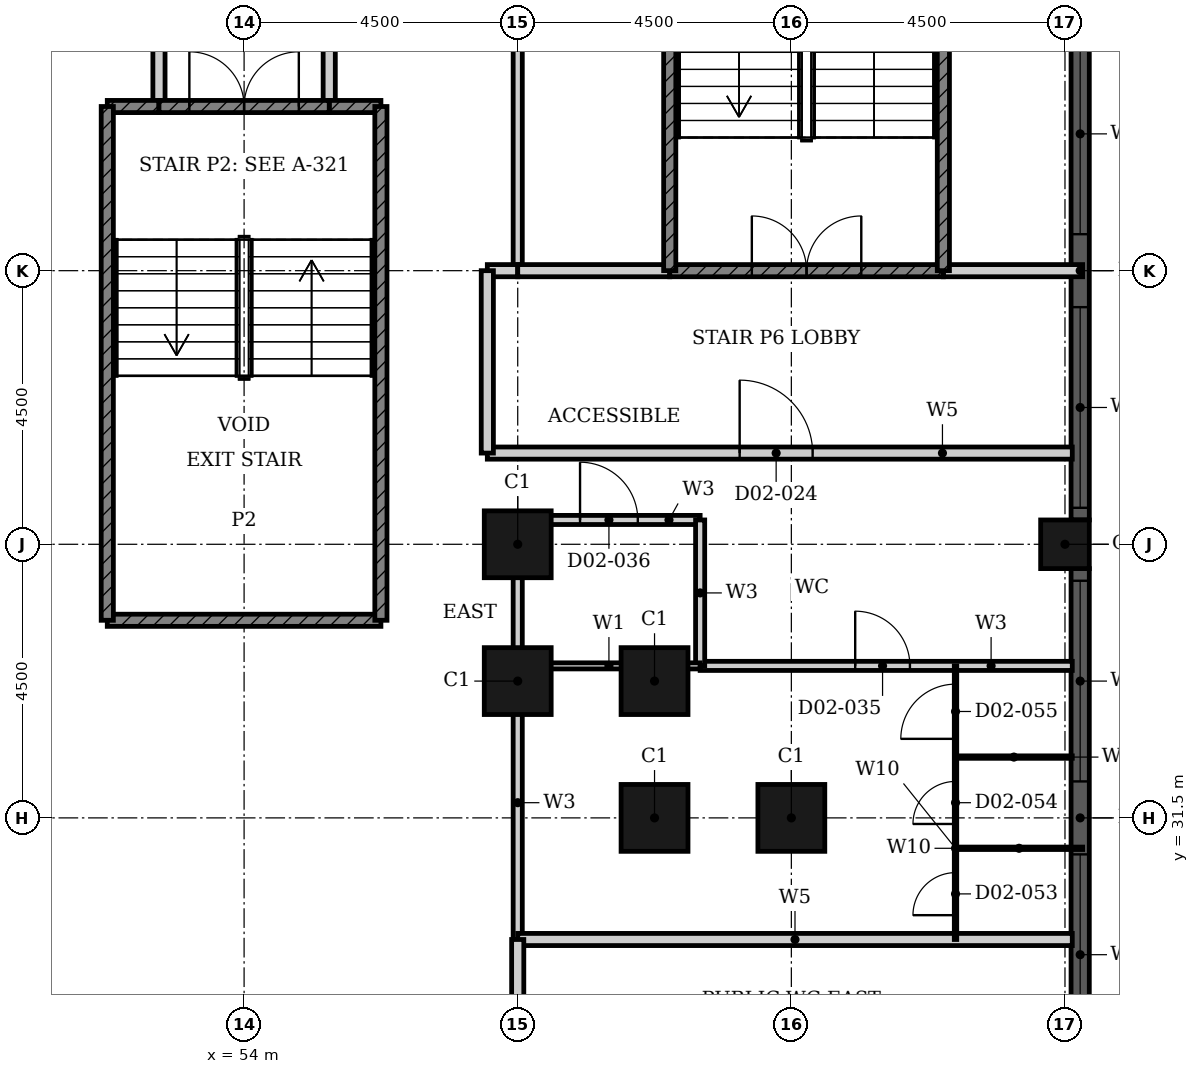
"""IFC4 building model, lengths in metres.
Left out: names, types, materials, properties, quantities, classifications, styles, units other than length and angle.
Written with IfcOpenShell. Run it as: python <this file> out.ifc"""

import sys

from ifc_helpers import new_model, si_unit, direction, frame, frame_2d, origin, origin_2d, place, context, subcontext, project, spatial, rectangle, hollow_rectangle, extrude, element, fill, save


model = new_model("IFC4")
c1 = context("Model", 3, precision=1e-05, world=origin(), true_north=direction((0.0, 1.0)))
c2 = subcontext(c1, "Body", "Model", "MODEL_VIEW")
j1 = project(units=[si_unit("LENGTHUNIT", "METRE"), si_unit("PLANEANGLEUNIT", "RADIAN")], contexts=[c1])
p1 = place(None, origin())
s1 = spatial("IfcSite", under=j1, at=p1, CompositionType="ELEMENT")
p2 = place(p1, origin())
s2 = spatial("IfcBuilding", under=s1, at=p2, CompositionType="ELEMENT")
p3 = place(p2, frame((0.0, 0.0, 12.0)))
s3 = spatial("IfcBuildingStorey", under=s2, at=p3, CompositionType="ELEMENT", Elevation=12.0)
for number, where, z_axis, x_axis in (
    (1, (63.0, 31.5, 0.0), (0.0, 0.0, 1.0), (1.0, 0.0, 0.0)),
    (2, (60.75, 31.5, 0.0), (0.0, 0.0, 1.0), (1.0, 0.0, 0.0)),
    (3, (60.75, 33.75, 0.0), (0.0, 0.0, 1.0), (1.0, 0.0, 0.0)),
    (4, (58.5, 33.75, 0.0), (0.0, 0.0, 1.0), (1.0, 0.0, 0.0)),
    (5, (58.5, 36.0, 0.0), (0.0, 0.0, 1.0), (1.0, 0.0, 0.0)),
):
    element("IfcColumn", number, at=place(p3, frame(where, z_axis=z_axis, x_axis=x_axis)), inside=s3, PredefinedType="COLUMN", context=c2, shape_type="SweptSolid", body=[
        extrude(hollow_rectangle(XDim=1.1, YDim=1.1, WallThickness=0.036, at=origin_2d()), origin(), (0.0, 0.0, 1.0), 5.4),
    ])
p4 = place(p3, frame((67.5, 36.0, 0.0), z_axis=(0.0, 0.0, 1.0), x_axis=(1.0, 0.0, 0.0)))
e6 = element("IfcColumn", 6, at=p4, inside=s3, PredefinedType="COLUMN", context=c2, shape_type="SweptSolid", body=[
    extrude(hollow_rectangle(XDim=0.8, YDim=0.8, WallThickness=0.025, at=origin_2d()), origin(), (0.0, 0.0, 1.0), 5.4),
])
p5 = place(p3, frame((67.75, 27.4, 0.0), z_axis=(0.0, 0.0, 1.0), x_axis=(0.0, 1.0, 0.0)))
e7 = element("IfcWall", 7, at=p5, inside=s3, PredefinedType="SOLIDWALL", context=c2, shape_type="SweptSolid", body=[
    extrude(rectangle(XDim=8.2, YDim=0.3, at=frame_2d((4.1, 0.0))), origin(), (0.0, 0.0, 1.0), 5.4),
])
p6 = place(p5, frame((0.2, 0.0, 0.9)))
e8 = element("IfcOpeningElement", 8, at=p6, cuts=e7, PredefinedType="OPENING", context=c2, shape_type="SweptSolid", body=[
    extrude(rectangle(XDim=3.3, YDim=3.5, at=frame_2d((1.65, 1.75))), frame((0.0, 0.16, 0.0), z_axis=(0.0, -1.0, 0.0), x_axis=(1.0, 0.0, 0.0)), (0.0, 0.0, 1.0), 0.32),
])
p7 = place(p5, frame((4.7, 0.0, 0.9)))
e9 = element("IfcOpeningElement", 9, at=p7, cuts=e7, PredefinedType="OPENING", context=c2, shape_type="SweptSolid", body=[
    extrude(rectangle(XDim=3.3, YDim=3.5, at=frame_2d((1.65, 1.75))), frame((0.0, 0.16, 0.0), z_axis=(0.0, -1.0, 0.0), x_axis=(1.0, 0.0, 0.0)), (0.0, 0.0, 1.0), 0.32),
])
p8 = place(p3, frame((67.75, 36.4, 0.0), z_axis=(0.0, 0.0, 1.0), x_axis=(0.0, 1.0, 0.0)))
e10 = element("IfcWall", 10, at=p8, inside=s3, PredefinedType="SOLIDWALL", context=c2, shape_type="SweptSolid", body=[
    extrude(rectangle(XDim=8.2, YDim=0.3, at=frame_2d((4.1, 0.0))), origin(), (0.0, 0.0, 1.0), 5.4),
])
p9 = place(p8, frame((0.2, 0.0, 0.9)))
e11 = element("IfcOpeningElement", 11, at=p9, cuts=e10, PredefinedType="OPENING", context=c2, shape_type="SweptSolid", body=[
    extrude(rectangle(XDim=3.3, YDim=3.5, at=frame_2d((1.65, 1.75))), frame((0.0, 0.16, 0.0), z_axis=(0.0, -1.0, 0.0), x_axis=(1.0, 0.0, 0.0)), (0.0, 0.0, 1.0), 0.32),
])
p10 = place(p8, frame((4.7, 0.0, 0.9)))
e12 = element("IfcOpeningElement", 12, at=p10, cuts=e10, PredefinedType="OPENING", context=c2, shape_type="SweptSolid", body=[
    extrude(rectangle(XDim=3.3, YDim=3.5, at=frame_2d((1.65, 1.75))), frame((0.0, 0.16, 0.0), z_axis=(0.0, -1.0, 0.0), x_axis=(1.0, 0.0, 0.0)), (0.0, 0.0, 1.0), 0.32),
])
p11 = place(p3, frame((61.5, 34.0, 0.0), z_axis=(0.0, 0.0, 1.0), x_axis=(1.0, 0.0, 0.0)))
e13 = element("IfcWall", 13, at=p11, inside=s3, PredefinedType="PARTITIONING", context=c2, shape_type="SweptSolid", body=[
    extrude(rectangle(XDim=6.12, YDim=0.15, at=frame_2d((3.06, 0.0))), origin(), (0.0, 0.0, 1.0), 5.05),
])
p12 = place(p11, frame((2.55, 0.0, 0.0)))
e14 = element("IfcOpeningElement", 14, at=p12, cuts=e13, PredefinedType="OPENING", context=c2, shape_type="SweptSolid", body=[
    extrude(rectangle(XDim=0.9, YDim=2.1, at=frame_2d((0.45, 1.05))), frame((0.0, 0.085, 0.0), z_axis=(0.0, -1.0, 0.0), x_axis=(1.0, 0.0, 0.0)), (0.0, 0.0, 1.0), 0.17),
])
p13 = place(p3, frame((58.5, 36.4, 0.0), z_axis=(0.0, 0.0, 1.0), x_axis=(1.0, 0.0, 0.0)))
e15 = element("IfcWall", 15, at=p13, inside=s3, PredefinedType="PARTITIONING", context=c2, shape_type="SweptSolid", body=[
    extrude(rectangle(XDim=3.0, YDim=0.15, at=frame_2d((1.5, 0.0))), origin(), (0.0, 0.0, 1.0), 5.05),
])
p14 = place(p13, frame((1.025, 0.0, 0.0)))
e16 = element("IfcOpeningElement", 16, at=p14, cuts=e15, PredefinedType="OPENING", context=c2, shape_type="SweptSolid", body=[
    extrude(rectangle(XDim=0.95, YDim=2.1, at=frame_2d((0.475, 1.05))), frame((0.0, 0.085, 0.0), z_axis=(0.0, -1.0, 0.0), x_axis=(1.0, 0.0, 0.0)), (0.0, 0.0, 1.0), 0.17),
])
p15 = place(p3, frame((58.5, 29.5, 0.0), z_axis=(0.0, 0.0, 1.0), x_axis=(0.0, 1.0, 0.0)))
e17 = element("IfcWall", 17, at=p15, inside=s3, PredefinedType="PARTITIONING", context=c2, shape_type="SweptSolid", body=[
    extrude(rectangle(XDim=4.5, YDim=0.15, at=frame_2d((2.25, 0.0))), origin(), (0.0, 0.0, 1.0), 5.05),
])
p16 = place(p3, frame((58.5, 34.0, 0.0), z_axis=(0.0, 0.0, 1.0), x_axis=(0.0, 1.0, 0.0)))
e18 = element("IfcWall", 18, at=p16, inside=s3, PredefinedType="PARTITIONING", context=c2, shape_type="SweptSolid", body=[
    extrude(rectangle(XDim=2.4, YDim=0.15, at=frame_2d((1.2, 0.0))), origin(), (0.0, 0.0, 1.0), 5.05),
])
p17 = place(p3, frame((58.5, 40.5, 0.0), z_axis=(0.0, 0.0, 1.0), x_axis=(0.0, 1.0, 0.0)))
e19 = element("IfcWall", 19, at=p17, inside=s3, PredefinedType="PARTITIONING", context=c2, shape_type="SweptSolid", body=[
    extrude(rectangle(XDim=13.69, YDim=0.15, at=frame_2d((6.845, 0.0))), origin(), (0.0, 0.0, 1.0), 5.05),
])
p18 = place(p17, frame((6.15, 0.0, 0.0)))
e20 = element("IfcOpeningElement", 20, at=p18, cuts=e19, PredefinedType="OPENING", context=c2, shape_type="SweptSolid", body=[
    extrude(rectangle(XDim=1.2, YDim=2.4, at=frame_2d((0.6, 1.2))), frame((0.0, 0.085, 0.0), z_axis=(0.0, -1.0, 0.0), x_axis=(1.0, 0.0, 0.0)), (0.0, 0.0, 1.0), 0.17),
])
p19 = place(p3, frame((61.5, 34.0, 0.0), z_axis=(0.0, 0.0, 1.0), x_axis=(0.0, 1.0, 0.0)))
e21 = element("IfcWall", 21, at=p19, inside=s3, PredefinedType="PARTITIONING", context=c2, shape_type="SweptSolid", body=[
    extrude(rectangle(XDim=2.4, YDim=0.15, at=frame_2d((1.2, 0.0))), origin(), (0.0, 0.0, 1.0), 5.05),
])
p20 = place(p3, frame((58.5, 34.0, 0.0), z_axis=(0.0, 0.0, 1.0), x_axis=(1.0, 0.0, 0.0)))
e22 = element("IfcWall", 22, at=p20, inside=s3, PredefinedType="PARTITIONING", context=c2, shape_type="SweptSolid", body=[
    extrude(rectangle(XDim=3.0, YDim=0.1, at=frame_2d((1.5, 0.0))), origin(), (0.0, 0.0, 1.0), 5.05),
])
p21 = place(p3, frame((58.5, 29.5, 0.0), z_axis=(0.0, 0.0, 1.0), x_axis=(1.0, 0.0, 0.0)))
e23 = element("IfcWall", 23, at=p21, inside=s3, PredefinedType="PARTITIONING", context=c2, shape_type="SweptSolid", body=[
    extrude(rectangle(XDim=9.12, YDim=0.2, at=frame_2d((4.56, 0.0))), origin(), (0.0, 0.0, 1.0), 5.05),
])
p22 = place(p3, frame((58.0, 37.5, 0.0), z_axis=(0.0, 0.0, 1.0), x_axis=(1.0, 0.0, 0.0)))
e24 = element("IfcWall", 24, at=p22, inside=s3, PredefinedType="PARTITIONING", context=c2, shape_type="SweptSolid", body=[
    extrude(rectangle(XDim=9.62, YDim=0.2, at=frame_2d((4.81, 0.0))), origin(), (0.0, 0.0, 1.0), 5.05),
])
p23 = place(p22, frame((4.15, 0.0, 0.0)))
e25 = element("IfcOpeningElement", 25, at=p23, cuts=e24, PredefinedType="OPENING", context=c2, shape_type="SweptSolid", body=[
    extrude(rectangle(XDim=1.2, YDim=2.1, at=frame_2d((0.6, 1.05))), frame((0.0, 0.11, 0.0), z_axis=(0.0, -1.0, 0.0), x_axis=(1.0, 0.0, 0.0)), (0.0, 0.0, 1.0), 0.22),
])
p24 = place(p3, frame((58.0, 40.5, 0.0), z_axis=(0.0, 0.0, 1.0), x_axis=(1.0, 0.0, 0.0)))
e26 = element("IfcWall", 26, at=p24, inside=s3, PredefinedType="PARTITIONING", context=c2, shape_type="SweptSolid", body=[
    extrude(rectangle(XDim=0.5, YDim=0.2, at=frame_2d((0.25, 0.0))), origin(), (0.0, 0.0, 1.0), 5.05),
])
p25 = place(p3, frame((58.5, 40.5, 0.0), z_axis=(0.0, 0.0, 1.0), x_axis=(1.0, 0.0, 0.0)))
e27 = element("IfcWall", 27, at=p25, inside=s3, PredefinedType="PARTITIONING", context=c2, shape_type="SweptSolid", body=[
    extrude(rectangle(XDim=2.5, YDim=0.2, at=frame_2d((1.25, 0.0))), origin(), (0.0, 0.0, 1.0), 5.05),
])
p26 = place(p3, frame((65.5, 40.5, 0.0), z_axis=(0.0, 0.0, 1.0), x_axis=(1.0, 0.0, 0.0)))
e28 = element("IfcWall", 28, at=p26, inside=s3, PredefinedType="PARTITIONING", context=c2, shape_type="SweptSolid", body=[
    extrude(rectangle(XDim=2.29, YDim=0.2, at=frame_2d((1.145, 0.0))), origin(), (0.0, 0.0, 1.0), 5.05),
])
p27 = place(p3, frame((52.6, 43.2, 0.0), z_axis=(0.0, 0.0, 1.0), x_axis=(0.0, 1.0, 0.0)))
e29 = element("IfcWall", 29, at=p27, inside=s3, PredefinedType="PARTITIONING", context=c2, shape_type="SweptSolid", body=[
    extrude(rectangle(XDim=1.8, YDim=0.2, at=frame_2d((0.9, 0.0))), origin(), (0.0, 0.0, 1.0), 5.05),
])
p28 = place(p3, frame((55.4, 43.2, 0.0), z_axis=(0.0, 0.0, 1.0), x_axis=(0.0, 1.0, 0.0)))
e30 = element("IfcWall", 30, at=p28, inside=s3, PredefinedType="PARTITIONING", context=c2, shape_type="SweptSolid", body=[
    extrude(rectangle(XDim=10.92, YDim=0.2, at=frame_2d((5.46, 0.0))), origin(), (0.0, 0.0, 1.0), 5.05),
])
p29 = place(p28, frame((4.8, 0.0, 0.0)))
e31 = element("IfcOpeningElement", 31, at=p29, cuts=e30, PredefinedType="OPENING", context=c2, shape_type="SweptSolid", body=[
    extrude(rectangle(XDim=1.2, YDim=2.1, at=frame_2d((0.6, 1.05))), frame((0.0, 0.11, 0.0), z_axis=(0.0, -1.0, 0.0), x_axis=(1.0, 0.0, 0.0)), (0.0, 0.0, 1.0), 0.22),
])
p30 = place(p3, frame((58.0, 37.5, 0.0), z_axis=(0.0, 0.0, 1.0), x_axis=(0.0, 1.0, 0.0)))
e32 = element("IfcWall", 32, at=p30, inside=s3, PredefinedType="PARTITIONING", context=c2, shape_type="SweptSolid", body=[
    extrude(rectangle(XDim=3.0, YDim=0.2, at=frame_2d((1.5, 0.0))), origin(), (0.0, 0.0, 1.0), 5.05),
])
p31 = place(p3, frame((58.5, 17.75, 0.0), z_axis=(0.0, 0.0, 1.0), x_axis=(0.0, 1.0, 0.0)))
e33 = element("IfcWall", 33, at=p31, inside=s3, PredefinedType="PARTITIONING", context=c2, shape_type="SweptSolid", body=[
    extrude(rectangle(XDim=11.75, YDim=0.2, at=frame_2d((5.875, 0.0))), origin(), (0.0, 0.0, 1.0), 5.05),
])
p32 = place(p31, frame((5.375, 0.0, 0.0)))
e34 = element("IfcOpeningElement", 34, at=p32, cuts=e33, PredefinedType="OPENING", context=c2, shape_type="SweptSolid", body=[
    extrude(rectangle(XDim=1.0, YDim=2.1, at=frame_2d((0.5, 1.05))), frame((0.0, 0.11, 0.0), z_axis=(0.0, -1.0, 0.0), x_axis=(1.0, 0.0, 0.0)), (0.0, 0.0, 1.0), 0.22),
])
p33 = place(p3, frame((51.75, 34.75, 0.0), z_axis=(0.0, 0.0, 1.0), x_axis=(1.0, 0.0, 0.0)))
e35 = element("IfcWall", 35, at=p33, inside=s3, PredefinedType="SHEAR", context=c2, shape_type="SweptSolid", body=[
    extrude(rectangle(XDim=4.5, YDim=0.2, at=frame_2d((2.25, 0.0))), origin(), (0.0, 0.0, 1.0), 5.05),
])
p34 = place(p3, frame((61.0, 40.5, 0.0), z_axis=(0.0, 0.0, 1.0), x_axis=(1.0, 0.0, 0.0)))
e36 = element("IfcWall", 36, at=p34, inside=s3, PredefinedType="SHEAR", context=c2, shape_type="SweptSolid", body=[
    extrude(rectangle(XDim=4.5, YDim=0.2, at=frame_2d((2.25, 0.0))), origin(), (0.0, 0.0, 1.0), 5.05),
])
p35 = place(p34, frame((1.35, 0.0, 0.0)))
e37 = element("IfcOpeningElement", 37, at=p35, cuts=e36, PredefinedType="OPENING", context=c2, shape_type="SweptSolid", body=[
    extrude(rectangle(XDim=1.8, YDim=2.1, at=frame_2d((0.9, 1.05))), frame((0.0, 0.11, 0.0), z_axis=(0.0, -1.0, 0.0), x_axis=(1.0, 0.0, 0.0)), (0.0, 0.0, 1.0), 0.22),
])
for number, where, z_axis, x_axis in (
    (38, (51.75, 43.2, 0.0), (0.0, 0.0, 1.0), (1.0, 0.0, 0.0)),
    (39, (55.4, 43.2, 0.0), (0.0, 0.0, 1.0), (1.0, 0.0, 0.0)),
):
    element("IfcWall", number, at=place(p3, frame(where, z_axis=z_axis, x_axis=x_axis)), inside=s3, PredefinedType="SHEAR", context=c2, shape_type="SweptSolid", body=[
        extrude(rectangle(XDim=0.85, YDim=0.2, at=frame_2d((0.425, 0.0))), origin(), (0.0, 0.0, 1.0), 5.05),
    ])
p36 = place(p3, frame((52.6, 43.2, 0.0), z_axis=(0.0, 0.0, 1.0), x_axis=(1.0, 0.0, 0.0)))
e40 = element("IfcWall", 40, at=p36, inside=s3, PredefinedType="SHEAR", context=c2, shape_type="SweptSolid", body=[
    extrude(rectangle(XDim=2.8, YDim=0.2, at=frame_2d((1.4, 0.0))), origin(), (0.0, 0.0, 1.0), 5.05),
])
p37 = place(p36, frame((0.5, 0.0, 0.0)))
e41 = element("IfcOpeningElement", 41, at=p37, cuts=e40, PredefinedType="OPENING", context=c2, shape_type="SweptSolid", body=[
    extrude(rectangle(XDim=1.8, YDim=2.1, at=frame_2d((0.9, 1.05))), frame((0.0, 0.11, 0.0), z_axis=(0.0, -1.0, 0.0), x_axis=(1.0, 0.0, 0.0)), (0.0, 0.0, 1.0), 0.22),
])
for number, where, z_axis, x_axis in (
    (42, (51.75, 34.75, 0.0), (0.0, 0.0, 1.0), (0.0, 1.0, 0.0)),
    (43, (56.25, 34.75, 0.0), (0.0, 0.0, 1.0), (0.0, 1.0, 0.0)),
    (44, (61.0, 40.5, 0.0), (0.0, 0.0, 1.0), (0.0, 1.0, 0.0)),
    (45, (65.5, 40.5, 0.0), (0.0, 0.0, 1.0), (0.0, 1.0, 0.0)),
):
    element("IfcWall", number, at=place(p3, frame(where, z_axis=z_axis, x_axis=x_axis)), inside=s3, PredefinedType="SHEAR", context=c2, shape_type="SweptSolid", body=[
        extrude(rectangle(XDim=8.45, YDim=0.2, at=frame_2d((4.225, 0.0))), origin(), (0.0, 0.0, 1.0), 5.05),
    ])
p38 = place(p3, frame((67.79, 31.0, 0.0), z_axis=(0.0, 0.0, 1.0), x_axis=(-1.0, 0.0, 0.0)))
e46 = element("IfcWall", 46, at=p38, inside=s3, PredefinedType="PARTITIONING", context=c2, shape_type="SweptSolid", body=[
    extrude(rectangle(XDim=2.09, YDim=0.04, at=frame_2d((1.045, 0.0))), origin(), (0.0, 0.0, 1.0), 5.05),
])
p39 = place(p3, frame((67.62, 32.5, 0.0), z_axis=(0.0, 0.0, 1.0), x_axis=(-1.0, 0.0, 0.0)))
e47 = element("IfcWall", 47, at=p39, inside=s3, PredefinedType="PARTITIONING", context=c2, shape_type="SweptSolid", body=[
    extrude(rectangle(XDim=1.92, YDim=0.04, at=frame_2d((0.96, 0.0))), origin(), (0.0, 0.0, 1.0), 5.05),
])
p40 = place(p3, frame((65.7, 29.5, 0.0), z_axis=(0.0, 0.0, 1.0), x_axis=(0.0, 1.0, 0.0)))
e48 = element("IfcWall", 48, at=p40, inside=s3, PredefinedType="PARTITIONING", context=c2, shape_type="SweptSolid", body=[
    extrude(rectangle(XDim=4.5, YDim=0.04, at=frame_2d((2.25, 0.0))), origin(), (0.0, 0.0, 1.0), 5.05),
])
p41 = place(p40, frame((0.4, 0.0, 0.0)))
e49 = element("IfcOpeningElement", 49, at=p41, cuts=e48, PredefinedType="OPENING", context=c2, shape_type="SweptSolid", body=[
    extrude(rectangle(XDim=0.7, YDim=2.0, at=frame_2d((0.35, 1.0))), frame((0.0, 0.03, 0.0), z_axis=(0.0, -1.0, 0.0), x_axis=(1.0, 0.0, 0.0)), (0.0, 0.0, 1.0), 0.06),
])
p42 = place(p40, frame((1.9, 0.0, 0.0)))
e50 = element("IfcOpeningElement", 50, at=p42, cuts=e48, PredefinedType="OPENING", context=c2, shape_type="SweptSolid", body=[
    extrude(rectangle(XDim=0.7, YDim=2.0, at=frame_2d((0.35, 1.0))), frame((0.0, 0.03, 0.0), z_axis=(0.0, -1.0, 0.0), x_axis=(1.0, 0.0, 0.0)), (0.0, 0.0, 1.0), 0.06),
])
p43 = place(p40, frame((3.3, 0.0, 0.0)))
e51 = element("IfcOpeningElement", 51, at=p43, cuts=e48, PredefinedType="OPENING", context=c2, shape_type="SweptSolid", body=[
    extrude(rectangle(XDim=0.9, YDim=2.0, at=frame_2d((0.45, 1.0))), frame((0.0, 0.03, 0.0), z_axis=(0.0, -1.0, 0.0), x_axis=(1.0, 0.0, 0.0)), (0.0, 0.0, 1.0), 0.06),
])
p44 = place(p6, origin())
e52 = element("IfcWindow", 52, at=p44, inside=s3, PartitioningType="SINGLE_PANEL", PredefinedType="WINDOW", context=c2, shape_type="SweptSolid", body=[
    extrude(rectangle(XDim=3.3, YDim=3.5, at=frame_2d((1.65, 1.75))), frame((0.0, 0.03, 0.0), z_axis=(0.0, -1.0, 0.0), x_axis=(1.0, 0.0, 0.0)), (0.0, 0.0, 1.0), 0.06),
])
fill(e8, e52)
p45 = place(p7, origin())
e53 = element("IfcWindow", 53, at=p45, inside=s3, PartitioningType="SINGLE_PANEL", PredefinedType="WINDOW", context=c2, shape_type="SweptSolid", body=[
    extrude(rectangle(XDim=3.3, YDim=3.5, at=frame_2d((1.65, 1.75))), frame((0.0, 0.03, 0.0), z_axis=(0.0, -1.0, 0.0), x_axis=(1.0, 0.0, 0.0)), (0.0, 0.0, 1.0), 0.06),
])
fill(e9, e53)
p46 = place(p9, origin())
e54 = element("IfcWindow", 54, at=p46, inside=s3, PartitioningType="SINGLE_PANEL", PredefinedType="WINDOW", context=c2, shape_type="SweptSolid", body=[
    extrude(rectangle(XDim=3.3, YDim=3.5, at=frame_2d((1.65, 1.75))), frame((0.0, 0.03, 0.0), z_axis=(0.0, -1.0, 0.0), x_axis=(1.0, 0.0, 0.0)), (0.0, 0.0, 1.0), 0.06),
])
fill(e11, e54)
p47 = place(p10, origin())
e55 = element("IfcWindow", 55, at=p47, inside=s3, PartitioningType="SINGLE_PANEL", PredefinedType="WINDOW", context=c2, shape_type="SweptSolid", body=[
    extrude(rectangle(XDim=3.3, YDim=3.5, at=frame_2d((1.65, 1.75))), frame((0.0, 0.03, 0.0), z_axis=(0.0, -1.0, 0.0), x_axis=(1.0, 0.0, 0.0)), (0.0, 0.0, 1.0), 0.06),
])
fill(e12, e55)
p48 = place(p37, origin())
e56 = element("IfcDoor", 56, at=p48, inside=s3, OperationType="DOUBLE_DOOR_SINGLE_SWING", PredefinedType="DOOR", context=c2, shape_type="SweptSolid", body=[
    extrude(rectangle(XDim=1.8, YDim=2.1, at=frame_2d((0.9, 1.05))), frame((0.0, 0.025, 0.0), z_axis=(0.0, -1.0, 0.0), x_axis=(1.0, 0.0, 0.0)), (0.0, 0.0, 1.0), 0.05),
])
fill(e41, e56)
p49 = place(p23, origin())
e57 = element("IfcDoor", 57, at=p49, inside=s3, OperationType="SINGLE_SWING_LEFT", PredefinedType="DOOR", context=c2, shape_type="SweptSolid", body=[
    extrude(rectangle(XDim=1.2, YDim=2.1, at=frame_2d((0.6, 1.05))), frame((0.0, 0.025, 0.0), z_axis=(0.0, -1.0, 0.0), x_axis=(1.0, 0.0, 0.0)), (0.0, 0.0, 1.0), 0.05),
])
fill(e25, e57)
p50 = place(p35, origin())
e58 = element("IfcDoor", 58, at=p50, inside=s3, OperationType="DOUBLE_DOOR_SINGLE_SWING", PredefinedType="DOOR", context=c2, shape_type="SweptSolid", body=[
    extrude(rectangle(XDim=1.8, YDim=2.1, at=frame_2d((0.9, 1.05))), frame((0.0, 0.025, 0.0), z_axis=(0.0, -1.0, 0.0), x_axis=(1.0, 0.0, 0.0)), (0.0, 0.0, 1.0), 0.05),
])
fill(e37, e58)
p51 = place(p12, origin())
e59 = element("IfcDoor", 59, at=p51, inside=s3, OperationType="SINGLE_SWING_RIGHT", PredefinedType="DOOR", context=c2, shape_type="SweptSolid", body=[
    extrude(rectangle(XDim=0.9, YDim=2.1, at=frame_2d((0.45, 1.05))), frame((0.0, 0.025, 0.0), z_axis=(0.0, -1.0, 0.0), x_axis=(1.0, 0.0, 0.0)), (0.0, 0.0, 1.0), 0.05),
])
fill(e14, e59)
p52 = place(p14, origin())
e60 = element("IfcDoor", 60, at=p52, inside=s3, OperationType="SINGLE_SWING_LEFT", PredefinedType="DOOR", context=c2, shape_type="SweptSolid", body=[
    extrude(rectangle(XDim=0.95, YDim=2.1, at=frame_2d((0.475, 1.05))), frame((0.0, 0.025, 0.0), z_axis=(0.0, -1.0, 0.0), x_axis=(1.0, 0.0, 0.0)), (0.0, 0.0, 1.0), 0.05),
])
fill(e16, e60)
p53 = place(p41, origin())
e61 = element("IfcDoor", 61, at=p53, inside=s3, OperationType="SINGLE_SWING_LEFT", PredefinedType="DOOR", context=c2, shape_type="SweptSolid", body=[
    extrude(rectangle(XDim=0.7, YDim=2.0, at=frame_2d((0.35, 1.0))), frame((0.0, 0.02, 0.0), z_axis=(0.0, -1.0, 0.0), x_axis=(1.0, 0.0, 0.0)), (0.0, 0.0, 1.0), 0.04),
])
fill(e49, e61)
p54 = place(p42, origin())
e62 = element("IfcDoor", 62, at=p54, inside=s3, OperationType="SINGLE_SWING_RIGHT", PredefinedType="DOOR", context=c2, shape_type="SweptSolid", body=[
    extrude(rectangle(XDim=0.7, YDim=2.0, at=frame_2d((0.35, 1.0))), frame((0.0, 0.02, 0.0), z_axis=(0.0, -1.0, 0.0), x_axis=(1.0, 0.0, 0.0)), (0.0, 0.0, 1.0), 0.04),
])
fill(e50, e62)
p55 = place(p43, origin())
e63 = element("IfcDoor", 63, at=p55, inside=s3, OperationType="SINGLE_SWING_RIGHT", PredefinedType="DOOR", context=c2, shape_type="SweptSolid", body=[
    extrude(rectangle(XDim=0.9, YDim=2.0, at=frame_2d((0.45, 1.0))), frame((0.0, 0.02, 0.0), z_axis=(0.0, -1.0, 0.0), x_axis=(1.0, 0.0, 0.0)), (0.0, 0.0, 1.0), 0.04),
])
fill(e51, e63)
save(model, sys.argv[1])
